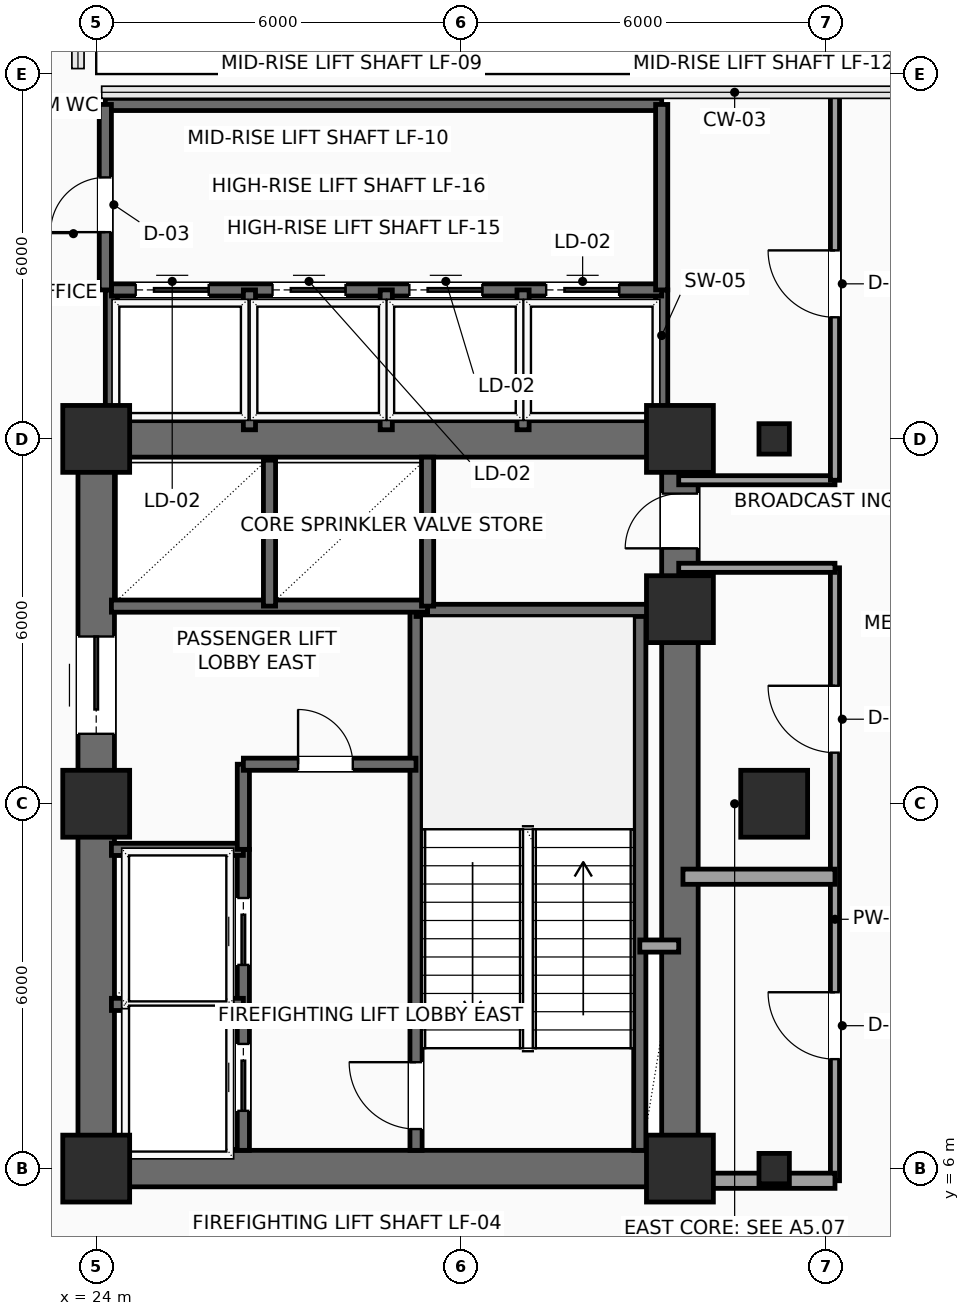
"""IFC4 building model, lengths in metres.
Left out: names, types, materials, properties, quantities, classifications, styles, units other than length and angle.
Written with IfcOpenShell. Run it as: python <this file> out.ifc"""

import sys

from ifc_helpers import new_model, si_unit, direction, frame, frame_2d, origin, origin_2d, place, context, subcontext, project, spatial, rectangle, hollow_rectangle, extrude, element, fill, save


model = new_model("IFC4")
c1 = context("Model", 3, precision=1e-05, world=origin(), true_north=direction((0.0, 1.0)))
c2 = subcontext(c1, "Body", "Model", "MODEL_VIEW")
j1 = project(units=[si_unit("LENGTHUNIT", "METRE"), si_unit("PLANEANGLEUNIT", "RADIAN")], contexts=[c1])
p1 = place(None, origin())
s1 = spatial("IfcSite", under=j1, at=p1, CompositionType="ELEMENT")
p2 = place(p1, origin())
s2 = spatial("IfcBuilding", under=s1, at=p2, CompositionType="ELEMENT")
p3 = place(p2, frame((0.0, 0.0, 126.9)))
s3 = spatial("IfcBuildingStorey", under=s2, at=p3, CompositionType="ELEMENT", Elevation=126.9)
for number, where, z_axis, x_axis in (
    (1, (24.0, 6.0, 0.0), (0.0, 0.0, 1.0), (1.0, 0.0, 0.0)),
    (2, (24.0, 12.0, 0.0), (0.0, 0.0, 1.0), (1.0, 0.0, 0.0)),
    (3, (24.0, 18.0, 0.0), (0.0, 0.0, 1.0), (1.0, 0.0, 0.0)),
    (4, (33.6, 6.0, 0.0), (0.0, 0.0, 1.0), (1.0, 0.0, 0.0)),
    (5, (33.6, 15.2, 0.0), (0.0, 0.0, 1.0), (1.0, 0.0, 0.0)),
    (6, (33.6, 18.0, 0.0), (0.0, 0.0, 1.0), (1.0, 0.0, 0.0)),
):
    element("IfcColumn", number, at=place(p3, frame(where, z_axis=z_axis, x_axis=x_axis)), inside=s3, PredefinedType="COLUMN", context=c2, shape_type="SweptSolid", body=[
        extrude(rectangle(XDim=1.1, YDim=1.1, at=origin_2d()), origin(), (0.0, 0.0, 1.0), 3.75),
    ])
p4 = place(p3, frame((35.15, 6.0, 0.0), z_axis=(0.0, 0.0, 1.0), x_axis=(1.0, 0.0, 0.0)))
e7 = element("IfcColumn", 7, at=p4, inside=s3, PredefinedType="COLUMN", context=c2, shape_type="SweptSolid", body=[
    extrude(hollow_rectangle(XDim=0.5, YDim=0.5, WallThickness=0.025, InnerFilletRadius=0.025, OuterFilletRadius=0.04, at=origin_2d()), origin(), (0.0, 0.0, 1.0), 3.75),
])
p5 = place(p3, frame((35.15, 12.0, 0.0), z_axis=(0.0, 0.0, 1.0), x_axis=(1.0, 0.0, 0.0)))
e8 = element("IfcColumn", 8, at=p5, inside=s3, PredefinedType="COLUMN", context=c2, shape_type="SweptSolid", body=[
    extrude(rectangle(XDim=1.1, YDim=1.1, at=origin_2d()), origin(), (0.0, 0.0, 1.0), 3.75),
])
p6 = place(p3, frame((35.15, 18.0, 0.0), z_axis=(0.0, 0.0, 1.0), x_axis=(1.0, 0.0, 0.0)))
e9 = element("IfcColumn", 9, at=p6, inside=s3, PredefinedType="COLUMN", context=c2, shape_type="SweptSolid", body=[
    extrude(hollow_rectangle(XDim=0.5, YDim=0.5, WallThickness=0.025, InnerFilletRadius=0.025, OuterFilletRadius=0.04, at=origin_2d()), origin(), (0.0, 0.0, 1.0), 3.75),
])
for number, where, z_axis, x_axis in (
    (10, (24.0, 6.0, 0.0), (0.0, 0.0, 1.0), (1.0, 0.0, 0.0)),
    (11, (24.0, 18.0, 0.0), (0.0, 0.0, 1.0), (1.0, 0.0, 0.0)),
):
    element("IfcWall", number, at=place(p3, frame(where, z_axis=z_axis, x_axis=x_axis)), inside=s3, PredefinedType="SHEAR", context=c2, shape_type="SweptSolid", body=[
        extrude(rectangle(XDim=9.6, YDim=0.6, at=frame_2d((4.8, 0.0))), origin(), (0.0, 0.0, 1.0), 3.525),
    ])
p7 = place(p3, frame((24.0, 6.0, 0.0), z_axis=(0.0, 0.0, 1.0), x_axis=(0.0, 1.0, 0.0)))
e12 = element("IfcWall", 12, at=p7, inside=s3, PredefinedType="SHEAR", context=c2, shape_type="SweptSolid", body=[
    extrude(rectangle(XDim=12.0, YDim=0.6, at=frame_2d((6.0, 0.0))), origin(), (0.0, 0.0, 1.0), 3.525),
])
p8 = place(p7, frame((7.15, 0.0, 0.0)))
e13 = element("IfcOpeningElement", 13, at=p8, cuts=e12, PredefinedType="OPENING", context=c2, shape_type="SweptSolid", body=[
    extrude(rectangle(XDim=1.6, YDim=2.3, at=frame_2d((0.8, 1.15))), frame((0.0, 0.31, 0.0), z_axis=(0.0, -1.0, 0.0), x_axis=(1.0, 0.0, 0.0)), (0.0, 0.0, 1.0), 0.62),
])
p9 = place(p3, frame((33.6, 6.0, 0.0), z_axis=(0.0, 0.0, 1.0), x_axis=(0.0, 1.0, 0.0)))
e14 = element("IfcWall", 14, at=p9, inside=s3, PredefinedType="SHEAR", context=c2, shape_type="SweptSolid", body=[
    extrude(rectangle(XDim=12.0, YDim=0.6, at=frame_2d((6.0, 0.0))), origin(), (0.0, 0.0, 1.0), 3.525),
])
p10 = place(p9, frame((10.2, 0.0, 0.0)))
e15 = element("IfcOpeningElement", 15, at=p10, cuts=e14, PredefinedType="OPENING", context=c2, shape_type="SweptSolid", body=[
    extrude(rectangle(XDim=0.9, YDim=2.15, at=frame_2d((0.45, 1.075))), frame((0.0, 0.31, 0.0), z_axis=(0.0, -1.0, 0.0), x_axis=(1.0, 0.0, 0.0)), (0.0, 0.0, 1.0), 0.62),
])
p11 = place(p3, frame((29.26, 6.3, 0.0), z_axis=(0.0, 0.0, 1.0), x_axis=(0.0, 1.0, 0.0)))
e16 = element("IfcWall", 16, at=p11, inside=s3, PredefinedType="SHEAR", context=c2, shape_type="SweptSolid", body=[
    extrude(rectangle(XDim=8.88, YDim=0.2, at=frame_2d((4.44, 0.0))), origin(), (0.0, 0.0, 1.0), 3.525),
])
p12 = place(p11, frame((0.35, 0.0, 0.0)))
e17 = element("IfcOpeningElement", 17, at=p12, cuts=e16, PredefinedType="OPENING", context=c2, shape_type="SweptSolid", body=[
    extrude(rectangle(XDim=1.1, YDim=2.2, at=frame_2d((0.55, 1.1))), frame((0.0, 0.11, 0.0), z_axis=(0.0, -1.0, 0.0), x_axis=(1.0, 0.0, 0.0)), (0.0, 0.0, 1.0), 0.22),
])
p13 = place(p3, frame((32.94, 6.3, 0.0), z_axis=(0.0, 0.0, 1.0), x_axis=(0.0, 1.0, 0.0)))
e18 = element("IfcWall", 18, at=p13, inside=s3, PredefinedType="SHEAR", context=c2, shape_type="SweptSolid", body=[
    extrude(rectangle(XDim=8.88, YDim=0.2, at=frame_2d((4.44, 0.0))), origin(), (0.0, 0.0, 1.0), 3.525),
])
p14 = place(p3, frame((29.26, 15.18, 0.0), z_axis=(0.0, 0.0, 1.0), x_axis=(1.0, 0.0, 0.0)))
e19 = element("IfcWall", 19, at=p14, inside=s3, PredefinedType="SHEAR", context=c2, shape_type="SweptSolid", body=[
    extrude(rectangle(XDim=4.04, YDim=0.2, at=frame_2d((2.02, 0.0))), origin(), (0.0, 0.0, 1.0), 3.525),
])
p15 = place(p3, frame((26.42, 6.3, 0.0), z_axis=(0.0, 0.0, 1.0), x_axis=(0.0, 1.0, 0.0)))
e20 = element("IfcWall", 20, at=p15, inside=s3, PredefinedType="SHEAR", context=c2, shape_type="SweptSolid", body=[
    extrude(rectangle(XDim=4.95, YDim=0.2, at=frame_2d((2.475, 0.0))), origin(), (0.0, 0.0, 1.0), 3.525),
])
p16 = place(p15, frame((0.65, 0.0, 0.0)))
e21 = element("IfcOpeningElement", 21, at=p16, cuts=e20, PredefinedType="OPENING", context=c2, shape_type="SweptSolid", body=[
    extrude(rectangle(XDim=1.1, YDim=2.2, at=frame_2d((0.55, 1.1))), frame((0.0, 0.11, 0.0), z_axis=(0.0, -1.0, 0.0), x_axis=(1.0, 0.0, 0.0)), (0.0, 0.0, 1.0), 0.22),
])
p17 = place(p15, frame((3.05, 0.0, 0.0)))
e22 = element("IfcOpeningElement", 22, at=p17, cuts=e20, PredefinedType="OPENING", context=c2, shape_type="SweptSolid", body=[
    extrude(rectangle(XDim=1.1, YDim=2.2, at=frame_2d((0.55, 1.1))), frame((0.0, 0.11, 0.0), z_axis=(0.0, -1.0, 0.0), x_axis=(1.0, 0.0, 0.0)), (0.0, 0.0, 1.0), 0.22),
])
for number, where, z_axis, x_axis in (
    (23, (24.25, 8.7, 0.0), (0.0, 0.0, 1.0), (1.0, 0.0, 0.0)),
    (24, (24.25, 11.25, 0.0), (0.0, 0.0, 1.0), (1.0, 0.0, 0.0)),
):
    element("IfcWall", number, at=place(p3, frame(where, z_axis=z_axis, x_axis=x_axis)), inside=s3, PredefinedType="SHEAR", context=c2, shape_type="SweptSolid", body=[
        extrude(rectangle(XDim=2.17, YDim=0.2, at=frame_2d((1.085, 0.0))), origin(), (0.0, 0.0, 1.0), 3.525),
    ])
p18 = place(p3, frame((26.42, 11.25, 0.0), z_axis=(0.0, 0.0, 1.0), x_axis=(0.0, 1.0, 0.0)))
e25 = element("IfcWall", 25, at=p18, inside=s3, PredefinedType="SHEAR", context=c2, shape_type="SweptSolid", body=[
    extrude(rectangle(XDim=1.4, YDim=0.2, at=frame_2d((0.7, 0.0))), origin(), (0.0, 0.0, 1.0), 3.525),
])
p19 = place(p3, frame((26.42, 12.65, 0.0), z_axis=(0.0, 0.0, 1.0), x_axis=(1.0, 0.0, 0.0)))
e26 = element("IfcWall", 26, at=p19, inside=s3, PredefinedType="SHEAR", context=c2, shape_type="SweptSolid", body=[
    extrude(rectangle(XDim=2.84, YDim=0.2, at=frame_2d((1.42, 0.0))), origin(), (0.0, 0.0, 1.0), 3.525),
])
p20 = place(p19, frame((0.9, 0.0, 0.0)))
e27 = element("IfcOpeningElement", 27, at=p20, cuts=e26, PredefinedType="OPENING", context=c2, shape_type="SweptSolid", body=[
    extrude(rectangle(XDim=0.9, YDim=2.15, at=frame_2d((0.45, 1.075))), frame((0.0, 0.11, 0.0), z_axis=(0.0, -1.0, 0.0), x_axis=(1.0, 0.0, 0.0)), (0.0, 0.0, 1.0), 0.22),
])
p21 = place(p3, frame((32.94, 9.66, 0.0), z_axis=(0.0, 0.0, 1.0), x_axis=(1.0, 0.0, 0.0)))
e28 = element("IfcWall", 28, at=p21, inside=s3, PredefinedType="SOLIDWALL", context=c2, shape_type="SweptSolid", body=[
    extrude(rectangle(XDim=0.64, YDim=0.2, at=frame_2d((0.32, 0.0))), origin(), (0.0, 0.0, 1.0), 3.525),
])
p22 = place(p3, frame((24.25, 15.25, 0.0), z_axis=(0.0, 0.0, 1.0), x_axis=(1.0, 0.0, 0.0)))
e29 = element("IfcWall", 29, at=p22, inside=s3, PredefinedType="SHEAR", context=c2, shape_type="SweptSolid", body=[
    extrude(rectangle(XDim=5.2, YDim=0.2, at=frame_2d((2.6, 0.0))), origin(), (0.0, 0.0, 1.0), 3.525),
])
p23 = place(p3, frame((26.85, 15.25, 0.0), z_axis=(0.0, 0.0, 1.0), x_axis=(0.0, 1.0, 0.0)))
e30 = element("IfcWall", 30, at=p23, inside=s3, PredefinedType="SHEAR", context=c2, shape_type="SweptSolid", body=[
    extrude(rectangle(XDim=2.4, YDim=0.2, at=frame_2d((1.2, 0.0))), origin(), (0.0, 0.0, 1.0), 3.525),
])
p24 = place(p3, frame((29.45, 15.25, 0.0), z_axis=(0.0, 0.0, 1.0), x_axis=(0.0, 1.0, 0.0)))
e31 = element("IfcWall", 31, at=p24, inside=s3, PredefinedType="SHEAR", context=c2, shape_type="SweptSolid", body=[
    extrude(rectangle(XDim=2.45, YDim=0.2, at=frame_2d((1.225, 0.0))), origin(), (0.0, 0.0, 1.0), 3.525),
])
for number, where, z_axis, x_axis in (
    (32, (33.3, 18.1, 0.0), (0.0, 0.0, 1.0), (0.0, 1.0, 0.0)),
    (33, (24.25, 18.1, 0.0), (0.0, 0.0, 1.0), (0.0, 1.0, 0.0)),
):
    element("IfcWall", number, at=place(p3, frame(where, z_axis=z_axis, x_axis=x_axis)), inside=s3, PredefinedType="SHEAR", context=c2, shape_type="SweptSolid", body=[
        extrude(rectangle(XDim=2.35, YDim=0.2, at=frame_2d((1.175, 0.0))), origin(), (0.0, 0.0, 1.0), 3.525),
    ])
p25 = place(p3, frame((24.25, 20.45, 0.0), z_axis=(0.0, 0.0, 1.0), x_axis=(1.0, 0.0, 0.0)))
e34 = element("IfcWall", 34, at=p25, inside=s3, PredefinedType="SHEAR", context=c2, shape_type="SweptSolid", body=[
    extrude(rectangle(XDim=9.05, YDim=0.2, at=frame_2d((4.525, 0.0))), origin(), (0.0, 0.0, 1.0), 3.525),
])
p26 = place(p25, frame((0.4, 0.0, 0.0)))
e35 = element("IfcOpeningElement", 35, at=p26, cuts=e34, PredefinedType="OPENING", context=c2, shape_type="SweptSolid", body=[
    extrude(rectangle(XDim=1.2, YDim=2.2, at=frame_2d((0.6, 1.1))), frame((0.0, 0.11, 0.0), z_axis=(0.0, -1.0, 0.0), x_axis=(1.0, 0.0, 0.0)), (0.0, 0.0, 1.0), 0.22),
])
p27 = place(p25, frame((2.65, 0.0, 0.0)))
e36 = element("IfcOpeningElement", 36, at=p27, cuts=e34, PredefinedType="OPENING", context=c2, shape_type="SweptSolid", body=[
    extrude(rectangle(XDim=1.2, YDim=2.2, at=frame_2d((0.6, 1.1))), frame((0.0, 0.11, 0.0), z_axis=(0.0, -1.0, 0.0), x_axis=(1.0, 0.0, 0.0)), (0.0, 0.0, 1.0), 0.22),
])
p28 = place(p25, frame((4.9, 0.0, 0.0)))
e37 = element("IfcOpeningElement", 37, at=p28, cuts=e34, PredefinedType="OPENING", context=c2, shape_type="SweptSolid", body=[
    extrude(rectangle(XDim=1.2, YDim=2.2, at=frame_2d((0.6, 1.1))), frame((0.0, 0.11, 0.0), z_axis=(0.0, -1.0, 0.0), x_axis=(1.0, 0.0, 0.0)), (0.0, 0.0, 1.0), 0.22),
])
p29 = place(p25, frame((7.15, 0.0, 0.0)))
e38 = element("IfcOpeningElement", 38, at=p29, cuts=e34, PredefinedType="OPENING", context=c2, shape_type="SweptSolid", body=[
    extrude(rectangle(XDim=1.2, YDim=2.2, at=frame_2d((0.6, 1.1))), frame((0.0, 0.11, 0.0), z_axis=(0.0, -1.0, 0.0), x_axis=(1.0, 0.0, 0.0)), (0.0, 0.0, 1.0), 0.22),
])
for number, where, z_axis, x_axis in (
    (39, (26.52, 18.15, 0.0), (0.0, 0.0, 1.0), (0.0, 1.0, 0.0)),
    (40, (28.77, 18.15, 0.0), (0.0, 0.0, 1.0), (0.0, 1.0, 0.0)),
    (41, (31.02, 18.15, 0.0), (0.0, 0.0, 1.0), (0.0, 1.0, 0.0)),
):
    element("IfcWall", number, at=place(p3, frame(where, z_axis=z_axis, x_axis=x_axis)), inside=s3, PredefinedType="SHEAR", context=c2, shape_type="SweptSolid", body=[
        extrude(rectangle(XDim=2.3, YDim=0.2, at=frame_2d((1.15, 0.0))), origin(), (0.0, 0.0, 1.0), 3.525),
    ])
p30 = place(p3, frame((24.15, 23.5, 0.0), z_axis=(0.0, 0.0, 1.0), x_axis=(1.0, 0.0, 0.0)))
e42 = element("IfcWall", 42, at=p30, inside=s3, PredefinedType="SHEAR", context=c2, shape_type="SweptSolid", body=[
    extrude(rectangle(XDim=9.15, YDim=0.2, at=frame_2d((4.575, 0.0))), origin(), (0.0, 0.0, 1.0), 3.525),
])
p31 = place(p3, frame((33.3, 20.45, 0.0), z_axis=(0.0, 0.0, 1.0), x_axis=(0.0, 1.0, 0.0)))
e43 = element("IfcWall", 43, at=p31, inside=s3, PredefinedType="SHEAR", context=c2, shape_type="SweptSolid", body=[
    extrude(rectangle(XDim=3.05, YDim=0.2, at=frame_2d((1.525, 0.0))), origin(), (0.0, 0.0, 1.0), 3.525),
])
p32 = place(p3, frame((24.15, 20.45, 0.0), z_axis=(0.0, 0.0, 1.0), x_axis=(0.0, 1.0, 0.0)))
e44 = element("IfcWall", 44, at=p32, inside=s3, PredefinedType="SHEAR", context=c2, shape_type="SweptSolid", body=[
    extrude(rectangle(XDim=3.05, YDim=0.2, at=frame_2d((1.525, 0.0))), origin(), (0.0, 0.0, 1.0), 3.525),
])
p33 = place(p32, frame((0.95, 0.0, 0.0)))
e45 = element("IfcOpeningElement", 45, at=p33, cuts=e44, PredefinedType="OPENING", context=c2, shape_type="SweptSolid", body=[
    extrude(rectangle(XDim=0.9, YDim=2.15, at=frame_2d((0.45, 1.075))), frame((0.0, 0.11, 0.0), z_axis=(0.0, -1.0, 0.0), x_axis=(1.0, 0.0, 0.0)), (0.0, 0.0, 1.0), 0.22),
])
p34 = place(p3, frame((36.15, 5.8, 0.0), z_axis=(0.0, 0.0, 1.0), x_axis=(0.0, 1.0, 0.0)))
e46 = element("IfcWall", 46, at=p34, inside=s3, PredefinedType="PARTITIONING", context=c2, shape_type="SweptSolid", body=[
    extrude(rectangle(XDim=10.08, YDim=0.15, at=frame_2d((5.04, 0.0))), origin(), (0.0, 0.0, 1.0), 3.525),
])
p35 = place(p34, frame((2.0, 0.0, 0.0)))
e47 = element("IfcOpeningElement", 47, at=p35, cuts=e46, PredefinedType="OPENING", context=c2, shape_type="SweptSolid", body=[
    extrude(rectangle(XDim=1.1, YDim=2.25, at=frame_2d((0.55, 1.125))), frame((0.0, 0.085, 0.0), z_axis=(0.0, -1.0, 0.0), x_axis=(1.0, 0.0, 0.0)), (0.0, 0.0, 1.0), 0.17),
])
p36 = place(p34, frame((7.04, 0.0, 0.0)))
e48 = element("IfcOpeningElement", 48, at=p36, cuts=e46, PredefinedType="OPENING", context=c2, shape_type="SweptSolid", body=[
    extrude(rectangle(XDim=1.1, YDim=2.25, at=frame_2d((0.55, 1.125))), frame((0.0, 0.085, 0.0), z_axis=(0.0, -1.0, 0.0), x_axis=(1.0, 0.0, 0.0)), (0.0, 0.0, 1.0), 0.17),
])
for number, where, z_axis, x_axis in (
    (49, (36.15, 15.88, 0.0), (0.0, 0.0, 1.0), (-1.0, 0.0, 0.0)),
    (50, (33.58, 17.32, 0.0), (0.0, 0.0, 1.0), (1.0, 0.0, 0.0)),
):
    element("IfcWall", number, at=place(p3, frame(where, z_axis=z_axis, x_axis=x_axis)), inside=s3, PredefinedType="PARTITIONING", context=c2, shape_type="SweptSolid", body=[
        extrude(rectangle(XDim=2.57, YDim=0.15, at=frame_2d((1.285, 0.0))), origin(), (0.0, 0.0, 1.0), 3.525),
    ])
p37 = place(p3, frame((36.15, 17.32, 0.0), z_axis=(0.0, 0.0, 1.0), x_axis=(0.0, 1.0, 0.0)))
e51 = element("IfcWall", 51, at=p37, inside=s3, PredefinedType="PARTITIONING", context=c2, shape_type="SweptSolid", body=[
    extrude(rectangle(XDim=6.38, YDim=0.15, at=frame_2d((3.19, 0.0))), origin(), (0.0, 0.0, 1.0), 3.525),
])
p38 = place(p37, frame((2.68, 0.0, 0.0)))
e52 = element("IfcOpeningElement", 52, at=p38, cuts=e51, PredefinedType="OPENING", context=c2, shape_type="SweptSolid", body=[
    extrude(rectangle(XDim=1.1, YDim=2.25, at=frame_2d((0.55, 1.125))), frame((0.0, 0.085, 0.0), z_axis=(0.0, -1.0, 0.0), x_axis=(1.0, 0.0, 0.0)), (0.0, 0.0, 1.0), 0.17),
])
p39 = place(p3, frame((33.65, 5.8, 0.0), z_axis=(0.0, 0.0, 1.0), x_axis=(1.0, 0.0, 0.0)))
e53 = element("IfcWall", 53, at=p39, inside=s3, PredefinedType="PARTITIONING", context=c2, shape_type="SweptSolid", body=[
    extrude(rectangle(XDim=2.5, YDim=0.25, at=frame_2d((1.25, 0.0))), origin(), (0.0, 0.0, 1.0), 3.017),
])
p40 = place(p3, frame((33.65, 10.8, 0.0), z_axis=(0.0, 0.0, 1.0), x_axis=(1.0, 0.0, 0.0)))
e54 = element("IfcWall", 54, at=p40, inside=s3, PredefinedType="PARTITIONING", context=c2, shape_type="SweptSolid", body=[
    extrude(rectangle(XDim=2.5, YDim=0.25, at=frame_2d((1.25, 0.0))), origin(), (0.0, 0.0, 1.0), 3.525),
])
p41 = place(p8, origin())
e55 = element("IfcDoor", 55, at=p41, inside=s3, OperationType="DOUBLE_DOOR_SLIDING", PredefinedType="DOOR", context=c2, shape_type="SweptSolid", body=[
    extrude(rectangle(XDim=1.6, YDim=2.3, at=frame_2d((0.8, 1.15))), frame((0.0, 0.025, 0.0), z_axis=(0.0, -1.0, 0.0), x_axis=(1.0, 0.0, 0.0)), (0.0, 0.0, 1.0), 0.05),
])
fill(e13, e55)
p42 = place(p10, origin())
e56 = element("IfcDoor", 56, at=p42, inside=s3, OperationType="SINGLE_SWING_LEFT", PredefinedType="DOOR", context=c2, shape_type="SweptSolid", body=[
    extrude(rectangle(XDim=0.9, YDim=2.15, at=frame_2d((0.45, 1.075))), frame((0.0, 0.025, 0.0), z_axis=(0.0, -1.0, 0.0), x_axis=(1.0, 0.0, 0.0)), (0.0, 0.0, 1.0), 0.05),
])
fill(e15, e56)
p43 = place(p12, origin())
e57 = element("IfcDoor", 57, at=p43, inside=s3, OperationType="SINGLE_SWING_RIGHT", PredefinedType="DOOR", context=c2, shape_type="SweptSolid", body=[
    extrude(rectangle(XDim=1.1, YDim=2.2, at=frame_2d((0.55, 1.1))), frame((0.0, 0.025, 0.0), z_axis=(0.0, -1.0, 0.0), x_axis=(1.0, 0.0, 0.0)), (0.0, 0.0, 1.0), 0.05),
])
fill(e17, e57)
p44 = place(p16, origin())
e58 = element("IfcDoor", 58, at=p44, inside=s3, OperationType="SLIDING_TO_LEFT", PredefinedType="DOOR", context=c2, shape_type="SweptSolid", body=[
    extrude(rectangle(XDim=1.1, YDim=2.2, at=frame_2d((0.55, 1.1))), frame((0.0, 0.025, 0.0), z_axis=(0.0, -1.0, 0.0), x_axis=(1.0, 0.0, 0.0)), (0.0, 0.0, 1.0), 0.05),
])
fill(e21, e58)
p45 = place(p17, origin())
e59 = element("IfcDoor", 59, at=p45, inside=s3, OperationType="SLIDING_TO_LEFT", PredefinedType="DOOR", context=c2, shape_type="SweptSolid", body=[
    extrude(rectangle(XDim=1.1, YDim=2.2, at=frame_2d((0.55, 1.1))), frame((0.0, 0.025, 0.0), z_axis=(0.0, -1.0, 0.0), x_axis=(1.0, 0.0, 0.0)), (0.0, 0.0, 1.0), 0.05),
])
fill(e22, e59)
p46 = place(p20, origin())
e60 = element("IfcDoor", 60, at=p46, inside=s3, OperationType="SINGLE_SWING_LEFT", PredefinedType="DOOR", context=c2, shape_type="SweptSolid", body=[
    extrude(rectangle(XDim=0.9, YDim=2.15, at=frame_2d((0.45, 1.075))), frame((0.0, 0.025, 0.0), z_axis=(0.0, -1.0, 0.0), x_axis=(1.0, 0.0, 0.0)), (0.0, 0.0, 1.0), 0.05),
])
fill(e27, e60)
p47 = place(p26, origin())
e61 = element("IfcDoor", 61, at=p47, inside=s3, OperationType="SLIDING_TO_RIGHT", PredefinedType="DOOR", context=c2, shape_type="SweptSolid", body=[
    extrude(rectangle(XDim=1.2, YDim=2.2, at=frame_2d((0.6, 1.1))), frame((0.0, 0.025, 0.0), z_axis=(0.0, -1.0, 0.0), x_axis=(1.0, 0.0, 0.0)), (0.0, 0.0, 1.0), 0.05),
])
fill(e35, e61)
p48 = place(p27, origin())
e62 = element("IfcDoor", 62, at=p48, inside=s3, OperationType="SLIDING_TO_RIGHT", PredefinedType="DOOR", context=c2, shape_type="SweptSolid", body=[
    extrude(rectangle(XDim=1.2, YDim=2.2, at=frame_2d((0.6, 1.1))), frame((0.0, 0.025, 0.0), z_axis=(0.0, -1.0, 0.0), x_axis=(1.0, 0.0, 0.0)), (0.0, 0.0, 1.0), 0.05),
])
fill(e36, e62)
p49 = place(p28, origin())
e63 = element("IfcDoor", 63, at=p49, inside=s3, OperationType="SLIDING_TO_RIGHT", PredefinedType="DOOR", context=c2, shape_type="SweptSolid", body=[
    extrude(rectangle(XDim=1.2, YDim=2.2, at=frame_2d((0.6, 1.1))), frame((0.0, 0.025, 0.0), z_axis=(0.0, -1.0, 0.0), x_axis=(1.0, 0.0, 0.0)), (0.0, 0.0, 1.0), 0.05),
])
fill(e37, e63)
p50 = place(p29, origin())
e64 = element("IfcDoor", 64, at=p50, inside=s3, OperationType="SLIDING_TO_RIGHT", PredefinedType="DOOR", context=c2, shape_type="SweptSolid", body=[
    extrude(rectangle(XDim=1.2, YDim=2.2, at=frame_2d((0.6, 1.1))), frame((0.0, 0.025, 0.0), z_axis=(0.0, -1.0, 0.0), x_axis=(1.0, 0.0, 0.0)), (0.0, 0.0, 1.0), 0.05),
])
fill(e38, e64)
p51 = place(p33, origin())
e65 = element("IfcDoor", 65, at=p51, inside=s3, OperationType="SINGLE_SWING_LEFT", PredefinedType="DOOR", context=c2, shape_type="SweptSolid", body=[
    extrude(rectangle(XDim=0.9, YDim=2.15, at=frame_2d((0.45, 1.075))), frame((0.0, 0.025, 0.0), z_axis=(0.0, -1.0, 0.0), x_axis=(1.0, 0.0, 0.0)), (0.0, 0.0, 1.0), 0.05),
])
fill(e45, e65)
p52 = place(p35, origin())
e66 = element("IfcDoor", 66, at=p52, inside=s3, OperationType="SINGLE_SWING_RIGHT", PredefinedType="DOOR", context=c2, shape_type="SweptSolid", body=[
    extrude(rectangle(XDim=1.1, YDim=2.25, at=frame_2d((0.55, 1.125))), frame((0.0, 0.025, 0.0), z_axis=(0.0, -1.0, 0.0), x_axis=(1.0, 0.0, 0.0)), (0.0, 0.0, 1.0), 0.05),
])
fill(e47, e66)
p53 = place(p36, origin())
e67 = element("IfcDoor", 67, at=p53, inside=s3, OperationType="SINGLE_SWING_RIGHT", PredefinedType="DOOR", context=c2, shape_type="SweptSolid", body=[
    extrude(rectangle(XDim=1.1, YDim=2.25, at=frame_2d((0.55, 1.125))), frame((0.0, 0.025, 0.0), z_axis=(0.0, -1.0, 0.0), x_axis=(1.0, 0.0, 0.0)), (0.0, 0.0, 1.0), 0.05),
])
fill(e48, e67)
p54 = place(p38, origin())
e68 = element("IfcDoor", 68, at=p54, inside=s3, OperationType="SINGLE_SWING_RIGHT", PredefinedType="DOOR", context=c2, shape_type="SweptSolid", body=[
    extrude(rectangle(XDim=1.1, YDim=2.25, at=frame_2d((0.55, 1.125))), frame((0.0, 0.025, 0.0), z_axis=(0.0, -1.0, 0.0), x_axis=(1.0, 0.0, 0.0)), (0.0, 0.0, 1.0), 0.05),
])
fill(e52, e68)
save(model, sys.argv[1])
